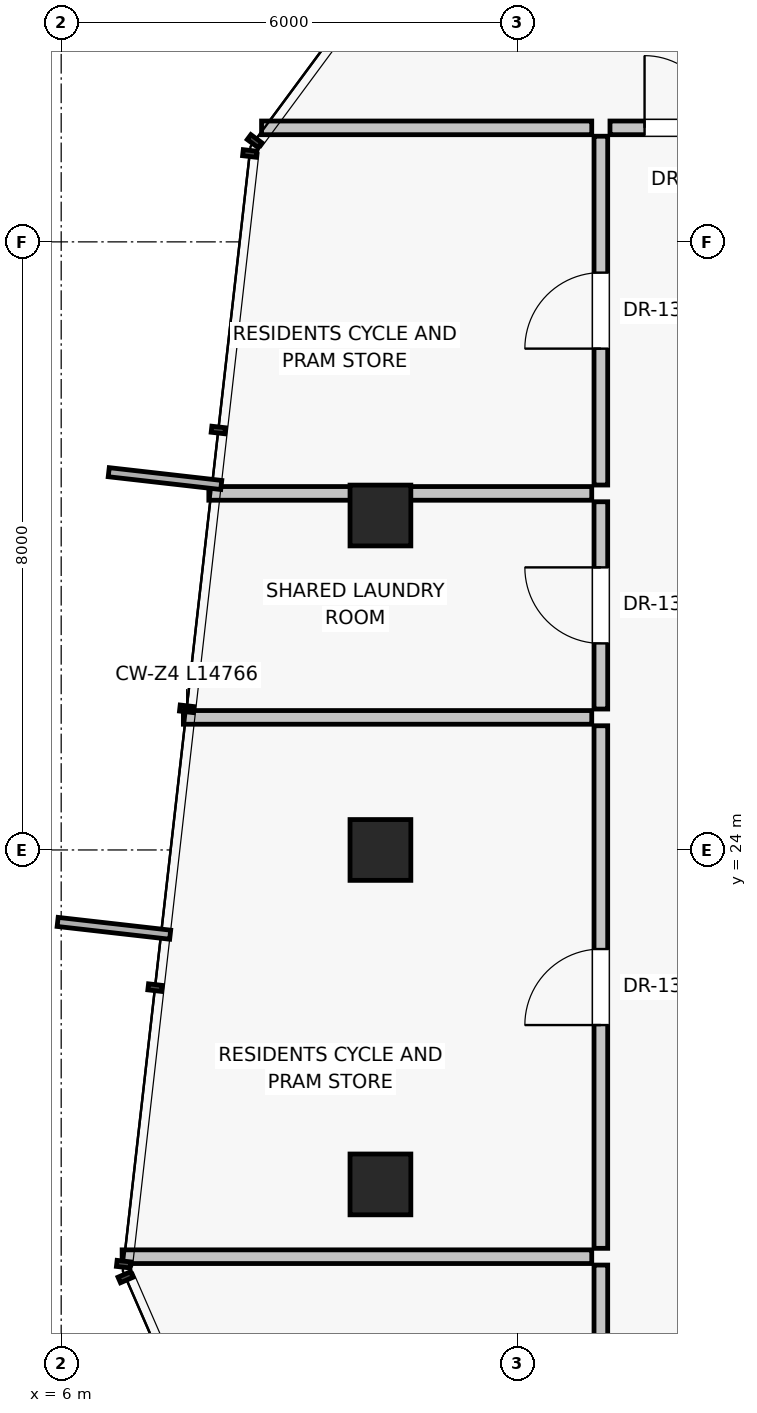
"""IFC4 building model, lengths in metres.
Left out: names, types, materials, properties, quantities, classifications, styles, units other than length and angle.
Written with IfcOpenShell. Run it as: python <this file> out.ifc"""

import sys

from ifc_helpers import new_model, si_unit, direction, frame, frame_2d, origin, origin_2d, place, context, subcontext, project, spatial, rectangle, extrude, source, transform, mapped, element, fill, save


model = new_model("IFC4")
c1 = context("Model", 3, precision=1e-05, world=origin(), true_north=direction((0.0, 1.0)))
c2 = subcontext(c1, "Body", "Model", "MODEL_VIEW")
j1 = project(units=[si_unit("LENGTHUNIT", "METRE"), si_unit("PLANEANGLEUNIT", "RADIAN")], contexts=[c1])
p1 = place(None, origin())
s1 = spatial("IfcSite", under=j1, at=p1, CompositionType="ELEMENT")
p2 = place(p1, origin())
s2 = spatial("IfcBuilding", under=s1, at=p2, CompositionType="ELEMENT")
p3 = place(p2, frame((0.0, 0.0, 230.05)))
s3 = spatial("IfcBuildingStorey", under=s2, at=p3, CompositionType="ELEMENT", Elevation=230.05)
for number, where, z_axis, x_axis in (
    (1, (10.2, 28.4, -0.235), (0.0, 0.0, 1.0), (1.0, 0.0, 0.0)),
    (2, (10.2, 24.0, -0.235), (0.0, 0.0, 1.0), (1.0, 0.0, 0.0)),
    (3, (10.2, 19.6, -0.235), (0.0, 0.0, 1.0), (1.0, 0.0, 0.0)),
):
    element("IfcColumn", number, at=place(p3, frame(where, z_axis=z_axis, x_axis=x_axis)), inside=s3, PredefinedType="COLUMN", context=c2, shape_type="SweptSolid", body=[
        extrude(rectangle(XDim=0.8, YDim=0.8, at=origin_2d()), origin(), (0.0, 0.0, 1.0), 3.485),
    ])
p4 = place(p3, frame((12.98, 33.5, 0.0), z_axis=(0.0, 0.0, 1.0), x_axis=(-1.0, 0.0, 0.0)))
e4 = element("IfcWall", 4, at=p4, inside=s3, PredefinedType="PARTITIONING", context=c2, shape_type="SweptSolid", body=[
    extrude(rectangle(XDim=4.344, YDim=0.18, at=frame_2d((2.172, 0.0))), origin(), (0.0, 0.0, 1.0), 3.015),
])
p5 = place(p3, frame((13.1, 14.41, 0.0), z_axis=(0.0, 0.0, 1.0), x_axis=(0.0, 1.0, 0.0)))
e5 = element("IfcWall", 5, at=p5, inside=s3, PredefinedType="PARTITIONING", context=c2, shape_type="SweptSolid", body=[
    extrude(rectangle(XDim=4.129, YDim=0.18, at=frame_2d((2.064, 0.0))), origin(), (0.0, 0.0, 1.0), 2.662),
])
p6 = place(p5, frame((1.564, 0.0, 0.0)))
e6 = element("IfcOpeningElement", 6, at=p6, cuts=e5, PredefinedType="OPENING", context=c2, shape_type="SweptSolid", body=[
    extrude(rectangle(XDim=1.0, YDim=2.01, at=frame_2d((0.5, 1.005))), frame((0.0, 0.1, 0.0), z_axis=(0.0, -1.0, 0.0), x_axis=(1.0, 0.0, 0.0)), (0.0, 0.0, 1.0), 0.2),
])
p7 = place(p3, frame((13.1, 18.759, 0.0), z_axis=(0.0, 0.0, 1.0), x_axis=(0.0, 1.0, 0.0)))
e7 = element("IfcWall", 7, at=p7, inside=s3, PredefinedType="PARTITIONING", context=c2, shape_type="SweptSolid", body=[
    extrude(rectangle(XDim=6.875, YDim=0.18, at=frame_2d((3.438, 0.0))), origin(), (0.0, 0.0, 1.0), 2.662),
])
p8 = place(p7, frame((2.938, 0.0, 0.0)))
e8 = element("IfcOpeningElement", 8, at=p8, cuts=e7, PredefinedType="OPENING", context=c2, shape_type="SweptSolid", body=[
    extrude(rectangle(XDim=1.0, YDim=2.01, at=frame_2d((0.5, 1.005))), frame((0.0, 0.1, 0.0), z_axis=(0.0, -1.0, 0.0), x_axis=(1.0, 0.0, 0.0)), (0.0, 0.0, 1.0), 0.2),
])
p9 = place(p3, frame((12.98, 18.649, 0.0), z_axis=(0.0, 0.0, 1.0), x_axis=(-1.0, 0.0, 0.0)))
e9 = element("IfcWall", 9, at=p9, inside=s3, PredefinedType="PARTITIONING", context=c2, shape_type="SweptSolid", body=[
    extrude(rectangle(XDim=6.178, YDim=0.18, at=frame_2d((3.089, 0.0))), origin(), (0.0, 0.0, 1.0), 3.015),
])
p10 = place(p3, frame((12.98, 25.744, 0.0), z_axis=(0.0, 0.0, 1.0), x_axis=(-1.0, 0.0, 0.0)))
e10 = element("IfcWall", 10, at=p10, inside=s3, PredefinedType="PARTITIONING", context=c2, shape_type="SweptSolid", body=[
    extrude(rectangle(XDim=5.372, YDim=0.18, at=frame_2d((2.686, 0.0))), origin(), (0.0, 0.0, 1.0), 3.015),
])
p11 = place(p3, frame((13.1, 25.854, 0.0), z_axis=(0.0, 0.0, 1.0), x_axis=(0.0, 1.0, 0.0)))
e11 = element("IfcWall", 11, at=p11, inside=s3, PredefinedType="PARTITIONING", context=c2, shape_type="SweptSolid", body=[
    extrude(rectangle(XDim=2.727, YDim=0.18, at=frame_2d((1.364, 0.0))), origin(), (0.0, 0.0, 1.0), 2.662),
])
p12 = place(p11, frame((0.864, 0.0, 0.0)))
e12 = element("IfcOpeningElement", 12, at=p12, cuts=e11, PredefinedType="OPENING", context=c2, shape_type="SweptSolid", body=[
    extrude(rectangle(XDim=1.0, YDim=2.01, at=frame_2d((0.5, 1.005))), frame((0.0, 0.1, 0.0), z_axis=(0.0, -1.0, 0.0), x_axis=(1.0, 0.0, 0.0)), (0.0, 0.0, 1.0), 0.2),
])
p13 = place(p3, frame((13.1, 28.801, 0.0), z_axis=(0.0, 0.0, 1.0), x_axis=(0.0, 1.0, 0.0)))
e13 = element("IfcWall", 13, at=p13, inside=s3, PredefinedType="PARTITIONING", context=c2, shape_type="SweptSolid", body=[
    extrude(rectangle(XDim=4.589, YDim=0.18, at=frame_2d((2.294, 0.0))), origin(), (0.0, 0.0, 1.0), 2.662),
])
p14 = place(p13, frame((1.794, 0.0, 0.0)))
e14 = element("IfcOpeningElement", 14, at=p14, cuts=e13, PredefinedType="OPENING", context=c2, shape_type="SweptSolid", body=[
    extrude(rectangle(XDim=1.0, YDim=2.01, at=frame_2d((0.5, 1.005))), frame((0.0, 0.1, 0.0), z_axis=(0.0, -1.0, 0.0), x_axis=(1.0, 0.0, 0.0)), (0.0, 0.0, 1.0), 0.2),
])
p15 = place(p3, frame((12.98, 28.691, 0.0), z_axis=(0.0, 0.0, 1.0), x_axis=(-1.0, 0.0, 0.0)))
e15 = element("IfcWall", 15, at=p15, inside=s3, PredefinedType="PARTITIONING", context=c2, shape_type="SweptSolid", body=[
    extrude(rectangle(XDim=5.038, YDim=0.18, at=frame_2d((2.519, 0.0))), origin(), (0.0, 0.0, 1.0), 3.015),
])
p16 = place(p3, frame((13.22, 33.5, 0.0), z_axis=(0.0, 0.0, 1.0), x_axis=(1.0, 0.0, 0.0)))
e16 = element("IfcWall", 16, at=p16, inside=s3, PredefinedType="PARTITIONING", context=c2, shape_type="SweptSolid", body=[
    extrude(rectangle(XDim=1.86, YDim=0.18, at=frame_2d((0.93, 0.0))), origin(), (0.0, 0.0, 1.0), 3.015),
])
p17 = place(p16, frame((0.455, 0.0, 0.0)))
e17 = element("IfcOpeningElement", 17, at=p17, cuts=e16, PredefinedType="OPENING", context=c2, shape_type="SweptSolid", body=[
    extrude(rectangle(XDim=0.95, YDim=2.02, at=frame_2d((0.475, 1.01))), frame((0.0, 0.1, 0.0), z_axis=(0.0, -1.0, 0.0), x_axis=(1.0, 0.0, 0.0)), (0.0, 0.0, 1.0), 0.2),
])
m1 = source(origin(), c2, "Body", "SweptSolid", [
    extrude(rectangle(XDim=1.0, YDim=2.01, at=frame_2d((0.5, 1.005))), frame((0.0, 0.025, 0.0), z_axis=(0.0, -1.0, 0.0), x_axis=(1.0, 0.0, 0.0)), (0.0, 0.0, 1.0), 0.05),
])
p18 = place(p8, origin())
e18 = element("IfcDoor", 18, at=p18, inside=s3, OperationType="SINGLE_SWING_LEFT", PredefinedType="DOOR", context=c2, shape_type="MappedRepresentation", body=[
    mapped(m1, transform((0.0, 0.0, 0.0), scale=1.0)),
])
fill(e8, e18)
p19 = place(p12, origin())
e19 = element("IfcDoor", 19, at=p19, inside=s3, OperationType="SINGLE_SWING_RIGHT", PredefinedType="DOOR", context=c2, shape_type="MappedRepresentation", body=[
    mapped(m1, transform((0.0, 0.0, 0.0), scale=1.0)),
])
fill(e12, e19)
p20 = place(p14, origin())
e20 = element("IfcDoor", 20, at=p20, inside=s3, OperationType="SINGLE_SWING_LEFT", PredefinedType="DOOR", context=c2, shape_type="MappedRepresentation", body=[
    mapped(m1, transform((0.0, 0.0, 0.0), scale=1.0)),
])
fill(e14, e20)
m2 = source(origin(), c2, "Body", "SweptSolid", [
    extrude(rectangle(XDim=0.95, YDim=2.02, at=frame_2d((0.475, 1.01))), frame((0.0, 0.025, 0.0), z_axis=(0.0, -1.0, 0.0), x_axis=(1.0, 0.0, 0.0)), (0.0, 0.0, 1.0), 0.05),
])
p21 = place(p17, origin())
e21 = element("IfcDoor", 21, at=p21, inside=s3, OperationType="SINGLE_SWING_LEFT", PredefinedType="DOOR", context=c2, shape_type="MappedRepresentation", body=[
    mapped(m2, transform((0.0, 0.0, 0.0), scale=1.0)),
])
fill(e17, e21)
save(model, sys.argv[1])
